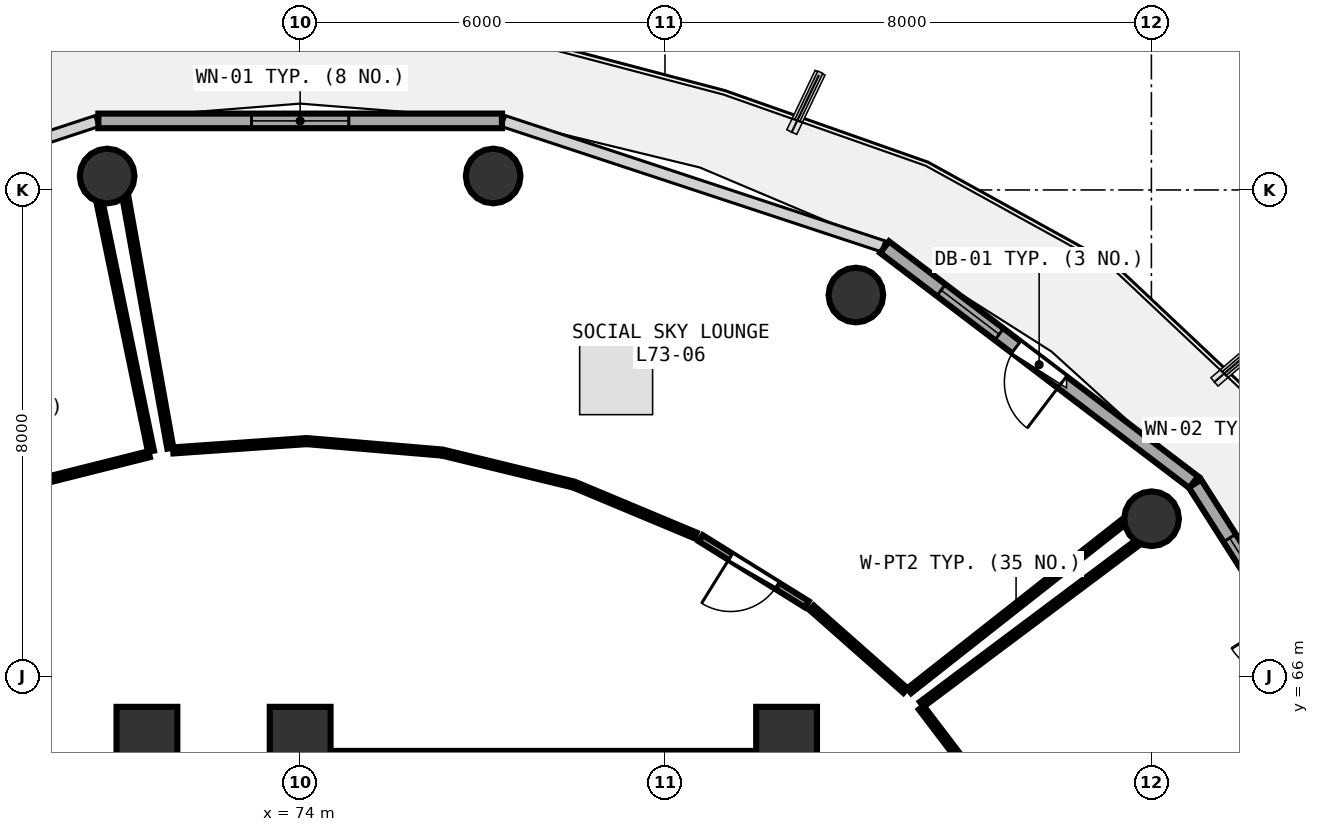
"""IFC4 building model, lengths in metres.
Left out: names, types, materials, properties, quantities, classifications, styles, units other than length and angle.
Written with IfcOpenShell. Run it as: python <this file> out.ifc"""

import sys

from ifc_helpers import new_model, si_unit, direction, frame, frame_2d, origin, origin_2d, place, context, subcontext, project, spatial, rectangle, circle, extrude, element, fill, save


model = new_model("IFC4")
c1 = context("Model", 3, precision=1e-05, world=origin(), true_north=direction((0.0, 1.0)))
c2 = subcontext(c1, "Body", "Model", "MODEL_VIEW")
j1 = project(units=[si_unit("LENGTHUNIT", "METRE"), si_unit("PLANEANGLEUNIT", "RADIAN")], contexts=[c1])
p1 = place(None, origin())
s1 = spatial("IfcSite", under=j1, at=p1, CompositionType="ELEMENT")
p2 = place(p1, origin())
s2 = spatial("IfcBuilding", under=s1, at=p2, CompositionType="ELEMENT")
p3 = place(p2, frame((0.0, 0.0, 286.2)))
s3 = spatial("IfcBuildingStorey", under=s2, at=p3, CompositionType="ELEMENT", Elevation=286.2)
for number, where, z_axis, x_axis in (
    (1, (82.0, 65.0, 0.0), (0.0, 0.0, 1.0), (1.0, 0.0, 0.0)),
    (2, (74.0, 65.0, 0.0), (0.0, 0.0, 1.0), (1.0, 0.0, 0.0)),
    (3, (71.48, 65.0, 0.0), (0.0, 0.0, 1.0), (1.0, 0.0, 0.0)),
):
    element("IfcColumn", number, at=place(p3, frame(where, z_axis=z_axis, x_axis=x_axis)), inside=s3, PredefinedType="PILASTER", context=c2, shape_type="SweptSolid", body=[
        extrude(rectangle(XDim=1.0, YDim=1.0, at=origin_2d()), origin(), (0.0, 0.0, 1.0), 3.75),
    ])
for number, where, z_axis, x_axis in (
    (4, (88.003, 68.593, 0.0), (0.0, 0.0, 1.0), (1.0, 0.0, 0.0)),
    (5, (83.14, 72.272, 0.0), (0.0, 0.0, 1.0), (1.0, 0.0, 0.0)),
    (6, (77.174, 74.229, 0.0), (0.0, 0.0, 1.0), (1.0, 0.0, 0.0)),
    (7, (70.826, 74.229, 0.0), (0.0, 0.0, 1.0), (1.0, 0.0, 0.0)),
):
    element("IfcColumn", number, at=place(p3, frame(where, z_axis=z_axis, x_axis=x_axis)), inside=s3, PredefinedType="COLUMN", context=c2, shape_type="SweptSolid", body=[
        extrude(circle(Radius=0.45, at=origin_2d()), origin(), (0.0, 0.0, 1.0), 3.75),
    ])
p4 = place(p3, frame((92.034, 63.964, 0.0), z_axis=(0.0, 0.0, 1.0), x_axis=(-0.537271968456, 0.843409053728, 0.0)))
e8 = element("IfcWall", 8, at=p4, inside=s3, PredefinedType="SOLIDWALL", context=c2, shape_type="SweptSolid", body=[
    extrude(rectangle(XDim=6.175, YDim=0.24, at=frame_2d((3.087, 0.0))), origin(), (0.0, 0.0, 1.0), 3.475),
])
p5 = place(p4, frame((2.613, 0.0, 0.0)))
e9 = element("IfcOpeningElement", 9, at=p5, cuts=e8, PredefinedType="OPENING", context=c2, shape_type="SweptSolid", body=[
    extrude(rectangle(XDim=0.95, YDim=2.1, at=frame_2d((0.475, 1.05))), frame((0.0, 0.13, 0.0), z_axis=(0.0, -1.0, 0.0), x_axis=(1.0, 0.0, 0.0)), (0.0, 0.0, 1.0), 0.26),
])
p6 = place(p4, frame((3.913, 0.0, 0.85)))
e10 = element("IfcOpeningElement", 10, at=p6, cuts=e8, PredefinedType="OPENING", context=c2, shape_type="SweptSolid", body=[
    extrude(rectangle(XDim=1.2, YDim=1.45, at=frame_2d((0.6, 0.725))), frame((0.0, 0.13, 0.0), z_axis=(0.0, -1.0, 0.0), x_axis=(1.0, 0.0, 0.0)), (0.0, 0.0, 1.0), 0.26),
])
p7 = place(p3, frame((88.696, 69.194, 0.0), z_axis=(0.0, 0.0, 1.0), x_axis=(-0.796010444211, 0.605282886514, 0.0)))
e11 = element("IfcWall", 11, at=p7, inside=s3, PredefinedType="SOLIDWALL", context=c2, shape_type="SweptSolid", body=[
    extrude(rectangle(XDim=6.387, YDim=0.24, at=frame_2d((3.194, 0.0))), origin(), (0.0, 0.0, 1.0), 3.475),
])
p8 = place(p7, frame((2.719, 0.0, 0.0)))
e12 = element("IfcOpeningElement", 12, at=p8, cuts=e11, PredefinedType="OPENING", context=c2, shape_type="SweptSolid", body=[
    extrude(rectangle(XDim=0.95, YDim=2.1, at=frame_2d((0.475, 1.05))), frame((0.0, 0.13, 0.0), z_axis=(0.0, -1.0, 0.0), x_axis=(1.0, 0.0, 0.0)), (0.0, 0.0, 1.0), 0.26),
])
p9 = place(p7, frame((4.019, 0.0, 0.85)))
e13 = element("IfcOpeningElement", 13, at=p9, cuts=e11, PredefinedType="OPENING", context=c2, shape_type="SweptSolid", body=[
    extrude(rectangle(XDim=1.2, YDim=1.45, at=frame_2d((0.6, 0.725))), frame((0.0, 0.13, 0.0), z_axis=(0.0, -1.0, 0.0), x_axis=(1.0, 0.0, 0.0)), (0.0, 0.0, 1.0), 0.26),
])
p10 = place(p3, frame((77.319, 75.136, 0.0), z_axis=(0.0, 0.0, 1.0), x_axis=(-1.0, 0.0, 0.0)))
e14 = element("IfcWall", 14, at=p10, inside=s3, PredefinedType="SOLIDWALL", context=c2, shape_type="SweptSolid", body=[
    extrude(rectangle(XDim=6.638, YDim=0.24, at=frame_2d((3.319, 0.0))), origin(), (0.0, 0.0, 1.0), 3.475),
])
p11 = place(p10, frame((2.519, 0.0, 0.85)))
e15 = element("IfcOpeningElement", 15, at=p11, cuts=e14, PredefinedType="OPENING", context=c2, shape_type="SweptSolid", body=[
    extrude(rectangle(XDim=1.6, YDim=1.45, at=frame_2d((0.8, 0.725))), frame((0.0, 0.13, 0.0), z_axis=(0.0, -1.0, 0.0), x_axis=(1.0, 0.0, 0.0)), (0.0, 0.0, 1.0), 0.26),
])
p12 = place(p3, frame((74.0, 64.6, 0.0), z_axis=(0.0, 0.0, 1.0), x_axis=(1.0, 0.0, 0.0)))
e16 = element("IfcWall", 16, at=p12, inside=s3, PredefinedType="SHEAR", context=c2, shape_type="SweptSolid", body=[
    extrude(rectangle(XDim=8.0, YDim=0.35, at=frame_2d((4.0, 0.0))), origin(), (0.0, 0.0, 1.0), 3.49),
])
p13 = place(p3, frame((82.332, 67.187, 0.0), z_axis=(0.0, 0.0, 1.0), x_axis=(-0.848878791214, 0.528587549823, 0.0)))
e17 = element("IfcWall", 17, at=p13, inside=s3, PredefinedType="PARTITIONING", context=c2, shape_type="SweptSolid", body=[
    extrude(rectangle(XDim=2.053, YDim=0.12, at=frame_2d((1.027, 0.0))), origin(), (0.0, 0.0, 1.0), 3.075),
])
p14 = place(p13, frame((0.577, 0.0, 0.0)))
e18 = element("IfcOpeningElement", 18, at=p14, cuts=e17, PredefinedType="OPENING", context=c2, shape_type="SweptSolid", body=[
    extrude(rectangle(XDim=0.9, YDim=2.08, at=frame_2d((0.45, 1.04))), frame((0.0, 0.07, 0.0), z_axis=(0.0, -1.0, 0.0), x_axis=(1.0, 0.0, 0.0)), (0.0, 0.0, 1.0), 0.14),
])
p15 = place(p3, frame((71.516, 69.654, 0.0), z_axis=(0.0, 0.0, 1.0), x_axis=(-0.969827312174, -0.243792913272, 0.0)))
e19 = element("IfcWall", 19, at=p15, inside=s3, PredefinedType="PARTITIONING", context=c2, shape_type="SweptSolid", body=[
    extrude(rectangle(XDim=2.147, YDim=0.1, at=frame_2d((1.073, 0.0))), origin(), (0.0, 0.0, 1.0), 3.075),
])
p16 = place(p3, frame((70.707, 73.77, 0.0), z_axis=(0.0, 0.0, 1.0), x_axis=(0.202308141573, -0.979321916355, 0.0)))
e20 = element("IfcWall", 20, at=p16, inside=s3, PredefinedType="PARTITIONING", context=c2, shape_type="SweptSolid", body=[
    extrude(rectangle(XDim=4.153, YDim=0.1, at=frame_2d((2.076, 0.0))), origin(), (0.0, 0.0, 1.0), 3.075),
])
p17 = place(p3, frame((85.435, 63.883, 0.0), z_axis=(0.0, 0.0, 1.0), x_axis=(-0.605473441765, 0.795865510823, 0.0)))
e21 = element("IfcWall", 21, at=p17, inside=s3, PredefinedType="PARTITIONING", context=c2, shape_type="SweptSolid", body=[
    extrude(rectangle(XDim=2.014, YDim=0.1, at=frame_2d((1.007, 0.0))), origin(), (0.0, 0.0, 1.0), 3.075),
])
p18 = place(p3, frame((84.223, 65.542, 0.0), z_axis=(0.0, 0.0, 1.0), x_axis=(0.800384816546, 0.599486568191, 0.0)))
e22 = element("IfcWall", 22, at=p18, inside=s3, PredefinedType="PARTITIONING", context=c2, shape_type="SweptSolid", body=[
    extrude(rectangle(XDim=4.414, YDim=0.1, at=frame_2d((2.207, 0.0))), origin(), (0.0, 0.0, 1.0), 3.175),
])
p19 = place(p3, frame((83.955, 65.767, 0.0), z_axis=(0.0, 0.0, 1.0), x_axis=(-0.749539941976, 0.661959119117, 0.0)))
e23 = element("IfcWall", 23, at=p19, inside=s3, PredefinedType="PARTITIONING", context=c2, shape_type="SweptSolid", body=[
    extrude(rectangle(XDim=2.057, YDim=0.1, at=frame_2d((1.029, 0.0))), origin(), (0.0, 0.0, 1.0), 3.075),
])
p20 = place(p3, frame((80.501, 68.319, 0.0), z_axis=(0.0, 0.0, 1.0), x_axis=(-0.922644563927, 0.385651408213, 0.0)))
e24 = element("IfcWall", 24, at=p20, inside=s3, PredefinedType="PARTITIONING", context=c2, shape_type="SweptSolid", body=[
    extrude(rectangle(XDim=2.125, YDim=0.1, at=frame_2d((1.062, 0.0))), origin(), (0.0, 0.0, 1.0), 3.48),
])
p21 = place(p3, frame((78.465, 69.164, 0.0), z_axis=(0.0, 0.0, 1.0), x_axis=(-0.971628772742, 0.236511158257, 0.0)))
e25 = element("IfcWall", 25, at=p21, inside=s3, PredefinedType="PARTITIONING", context=c2, shape_type="SweptSolid", body=[
    extrude(rectangle(XDim=2.147, YDim=0.1, at=frame_2d((1.074, 0.0))), origin(), (0.0, 0.0, 1.0), 3.48),
])
p22 = place(p3, frame((76.3, 69.684, 0.0), z_axis=(0.0, 0.0, 1.0), x_axis=(-0.99643184896, 0.084401246306, 0.0)))
e26 = element("IfcWall", 26, at=p22, inside=s3, PredefinedType="PARTITIONING", context=c2, shape_type="SweptSolid", body=[
    extrude(rectangle(XDim=2.161, YDim=0.1, at=frame_2d((1.081, 0.0))), origin(), (0.0, 0.0, 1.0), 3.075),
])
p23 = place(p3, frame((74.067, 69.867, 0.0), z_axis=(0.0, 0.0, 1.0), x_axis=(-0.997574370957, -0.069608723664, 0.0)))
e27 = element("IfcWall", 27, at=p23, inside=s3, PredefinedType="PARTITIONING", context=c2, shape_type="SweptSolid", body=[
    extrude(rectangle(XDim=2.16, YDim=0.1, at=frame_2d((1.08, 0.0))), origin(), (0.0, 0.0, 1.0), 3.48),
])
p24 = place(p3, frame((71.865, 69.753, 0.0), z_axis=(0.0, 0.0, 1.0), x_axis=(-0.176199339585, 0.984354505618, 0.0)))
e28 = element("IfcWall", 28, at=p24, inside=s3, PredefinedType="PARTITIONING", context=c2, shape_type="SweptSolid", body=[
    extrude(rectangle(XDim=4.176, YDim=0.1, at=frame_2d((2.088, 0.0))), origin(), (0.0, 0.0, 1.0), 3.175),
])
p25 = place(p3, frame((87.532, 68.532, 0.0), z_axis=(0.0, 0.0, 1.0), x_axis=(-0.785736749878, -0.618561039745, 0.0)))
e29 = element("IfcWall", 29, at=p25, inside=s3, PredefinedType="PARTITIONING", context=c2, shape_type="SweptSolid", body=[
    extrude(rectangle(XDim=4.475, YDim=0.1, at=frame_2d((2.237, 0.0))), origin(), (0.0, 0.0, 1.0), 3.075),
])
p26 = place(p6, origin())
e30 = element("IfcWindow", 30, at=p26, inside=s3, PartitioningType="SINGLE_PANEL", PredefinedType="WINDOW", context=c2, shape_type="SweptSolid", body=[
    extrude(rectangle(XDim=1.2, YDim=1.45, at=frame_2d((0.6, 0.725))), frame((0.0, 0.03, 0.0), z_axis=(0.0, -1.0, 0.0), x_axis=(1.0, 0.0, 0.0)), (0.0, 0.0, 1.0), 0.06),
])
fill(e10, e30)
p27 = place(p8, frame((0.95, 0.0, 0.0), z_axis=(0.0, 0.0, 1.0), x_axis=(-1.0, 0.0, 0.0)))
e31 = element("IfcDoor", 31, at=p27, inside=s3, OperationType="SINGLE_SWING_RIGHT", PredefinedType="DOOR", context=c2, shape_type="SweptSolid", body=[
    extrude(rectangle(XDim=0.95, YDim=2.1, at=frame_2d((0.475, 1.05))), frame((0.0, 0.025, 0.0), z_axis=(0.0, -1.0, 0.0), x_axis=(1.0, 0.0, 0.0)), (0.0, 0.0, 1.0), 0.05),
])
fill(e12, e31)
p28 = place(p9, origin())
e32 = element("IfcWindow", 32, at=p28, inside=s3, PartitioningType="SINGLE_PANEL", PredefinedType="WINDOW", context=c2, shape_type="SweptSolid", body=[
    extrude(rectangle(XDim=1.2, YDim=1.45, at=frame_2d((0.6, 0.725))), frame((0.0, 0.03, 0.0), z_axis=(0.0, -1.0, 0.0), x_axis=(1.0, 0.0, 0.0)), (0.0, 0.0, 1.0), 0.06),
])
fill(e13, e32)
p29 = place(p11, origin())
e33 = element("IfcWindow", 33, at=p29, inside=s3, PartitioningType="SINGLE_PANEL", PredefinedType="WINDOW", context=c2, shape_type="SweptSolid", body=[
    extrude(rectangle(XDim=1.6, YDim=1.45, at=frame_2d((0.8, 0.725))), frame((0.0, 0.03, 0.0), z_axis=(0.0, -1.0, 0.0), x_axis=(1.0, 0.0, 0.0)), (0.0, 0.0, 1.0), 0.06),
])
fill(e15, e33)
p30 = place(p14, origin())
e34 = element("IfcDoor", 34, at=p30, inside=s3, OperationType="SINGLE_SWING_RIGHT", PredefinedType="DOOR", context=c2, shape_type="SweptSolid", body=[
    extrude(rectangle(XDim=0.9, YDim=2.08, at=frame_2d((0.45, 1.04))), frame((0.0, 0.025, 0.0), z_axis=(0.0, -1.0, 0.0), x_axis=(1.0, 0.0, 0.0)), (0.0, 0.0, 1.0), 0.05),
])
fill(e18, e34)
save(model, sys.argv[1])
